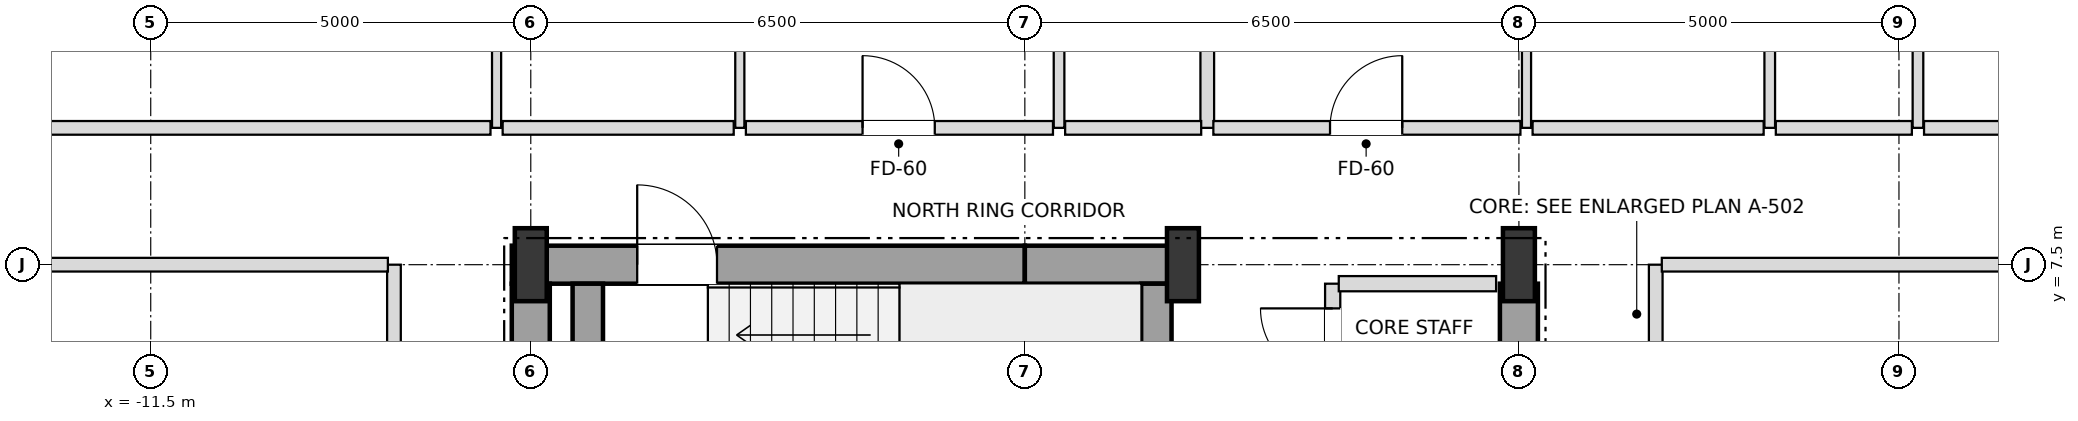
"""IFC4 building model, lengths in metres.
Left out: names, types, materials, properties, quantities, classifications, styles, units other than length and angle.
Written with IfcOpenShell. Run it as: python <this file> out.ifc"""

import sys

from ifc_helpers import new_model, si_unit, direction, frame, frame_2d, origin, origin_2d, place, context, subcontext, project, spatial, rectangle, i_section, extrude, element, fill, save


model = new_model("IFC4")
c1 = context("Model", 3, precision=1e-05, world=origin(), true_north=direction((0.0, 1.0)))
c2 = subcontext(c1, "Body", "Model", "MODEL_VIEW")
j1 = project(units=[si_unit("LENGTHUNIT", "METRE"), si_unit("PLANEANGLEUNIT", "RADIAN")], contexts=[c1])
p1 = place(None, origin())
s1 = spatial("IfcSite", under=j1, at=p1, CompositionType="ELEMENT")
p2 = place(p1, origin())
s2 = spatial("IfcBuilding", under=s1, at=p2, CompositionType="ELEMENT")
p3 = place(p2, frame((0.0, 0.0, 61.2)))
s3 = spatial("IfcBuildingStorey", under=s2, at=p3, CompositionType="ELEMENT", Elevation=61.2)
for number, where, z_axis, x_axis in (
    (1, (-6.5, 7.5, 0.0), (0.0, 0.0, 1.0), (1.0, 0.0, 0.0)),
    (2, (2.08, 7.5, 0.0), (0.0, 0.0, 1.0), (1.0, 0.0, 0.0)),
    (3, (6.5, 7.5, 0.0), (0.0, 0.0, 1.0), (1.0, 0.0, 0.0)),
):
    element("IfcColumn", number, at=place(p3, frame(where, z_axis=z_axis, x_axis=x_axis)), inside=s3, PredefinedType="COLUMN", context=c2, shape_type="SweptSolid", body=[
        extrude(i_section(OverallWidth=0.42, OverallDepth=0.96, WebThickness=0.022, FlangeThickness=0.034, at=origin_2d()), origin(), (0.0, 0.0, 1.0), 3.6),
    ])
p4 = place(p3, frame((-6.75, 7.5, 0.0), z_axis=(0.0, 0.0, 1.0), x_axis=(1.0, 0.0, 0.0)))
e4 = element("IfcWall", 4, at=p4, inside=s3, PredefinedType="SHEAR", context=c2, shape_type="SweptSolid", body=[
    extrude(rectangle(XDim=6.75, YDim=0.5, at=frame_2d((3.375, 0.0))), origin(), (0.0, 0.0, 1.0), 3.38),
])
p5 = place(p4, frame((1.65, 0.0, 0.0)))
e5 = element("IfcOpeningElement", 5, at=p5, cuts=e4, PredefinedType="OPENING", context=c2, shape_type="SweptSolid", body=[
    extrude(rectangle(XDim=1.05, YDim=2.15, at=frame_2d((0.525, 1.075))), frame((0.0, 0.26, 0.0), z_axis=(0.0, -1.0, 0.0), x_axis=(1.0, 0.0, 0.0)), (0.0, 0.0, 1.0), 0.52),
])
p6 = place(p3, frame((0.0, 7.5, 0.0), z_axis=(0.0, 0.0, 1.0), x_axis=(1.0, 0.0, 0.0)))
e6 = element("IfcWall", 6, at=p6, inside=s3, PredefinedType="SHEAR", context=c2, shape_type="SweptSolid", body=[
    extrude(rectangle(XDim=2.08, YDim=0.5, at=frame_2d((1.04, 0.0))), origin(), (0.0, 0.0, 1.0), 3.38),
])
for number, where, z_axis, x_axis in (
    (7, (-6.5, 3.95, 0.0), (0.0, 0.0, 1.0), (0.0, 1.0, 0.0)),
    (8, (6.5, 3.95, 0.0), (0.0, 0.0, 1.0), (0.0, 1.0, 0.0)),
):
    element("IfcWall", number, at=place(p3, frame(where, z_axis=z_axis, x_axis=x_axis)), inside=s3, PredefinedType="SHEAR", context=c2, shape_type="SweptSolid", body=[
        extrude(rectangle(XDim=3.3, YDim=0.5, at=frame_2d((1.65, 0.0))), origin(), (0.0, 0.0, 1.0), 3.38),
    ])
for number, where, z_axis, x_axis in (
    (9, (1.73, 3.95, 0.0), (0.0, 0.0, 1.0), (0.0, 1.0, 0.0)),
    (10, (-5.75, 3.95, 0.0), (0.0, 0.0, 1.0), (0.0, 1.0, 0.0)),
):
    element("IfcWall", number, at=place(p3, frame(where, z_axis=z_axis, x_axis=x_axis)), inside=s3, PredefinedType="SHEAR", context=c2, shape_type="SweptSolid", body=[
        extrude(rectangle(XDim=3.3, YDim=0.4, at=frame_2d((1.65, 0.0))), origin(), (0.0, 0.0, 1.0), 3.38),
    ])
p7 = place(p3, frame((-8.3, -7.5, 0.0), z_axis=(0.0, 0.0, 1.0), x_axis=(0.0, 1.0, 0.0)))
e11 = element("IfcWall", 11, at=p7, inside=s3, PredefinedType="PARTITIONING", context=c2, shape_type="SweptSolid", body=[
    extrude(rectangle(XDim=15.0, YDim=0.18, at=frame_2d((7.5, 0.0))), origin(), (0.0, 0.0, 1.0), 3.38),
])
p8 = place(p7, frame((3.475, 0.0, 0.0)))
e12 = element("IfcOpeningElement", 12, at=p8, cuts=e11, PredefinedType="OPENING", context=c2, shape_type="SweptSolid", body=[
    extrude(rectangle(XDim=0.95, YDim=2.15, at=frame_2d((0.475, 1.075))), frame((0.0, 0.1, 0.0), z_axis=(0.0, -1.0, 0.0), x_axis=(1.0, 0.0, 0.0)), (0.0, 0.0, 1.0), 0.2),
])
p9 = place(p3, frame((-6.95, 9.3, 0.0), z_axis=(0.0, 0.0, 1.0), x_axis=(0.0, 1.0, 0.0)))
e13 = element("IfcWall", 13, at=p9, inside=s3, PredefinedType="PARTITIONING", context=c2, shape_type="SweptSolid", body=[
    extrude(rectangle(XDim=9.6, YDim=0.12, at=frame_2d((4.8, 0.0))), origin(), (0.0, 0.0, 1.0), 2.816),
])
p10 = place(p9, frame((4.35, 0.0, 0.0)))
e14 = element("IfcOpeningElement", 14, at=p10, cuts=e13, PredefinedType="OPENING", context=c2, shape_type="SweptSolid", body=[
    extrude(rectangle(XDim=0.9, YDim=2.1, at=frame_2d((0.45, 1.05))), frame((0.0, 0.07, 0.0), z_axis=(0.0, -1.0, 0.0), x_axis=(1.0, 0.0, 0.0)), (0.0, 0.0, 1.0), 0.14),
])
p11 = place(p3, frame((-3.75, 9.3, 0.0), z_axis=(0.0, 0.0, 1.0), x_axis=(0.0, 1.0, 0.0)))
e15 = element("IfcWall", 15, at=p11, inside=s3, PredefinedType="PARTITIONING", context=c2, shape_type="SweptSolid", body=[
    extrude(rectangle(XDim=15.6, YDim=0.12, at=frame_2d((7.8, 0.0))), origin(), (0.0, 0.0, 1.0), 2.816),
])
p12 = place(p11, frame((4.325, 0.0, 0.0)))
e16 = element("IfcOpeningElement", 16, at=p12, cuts=e15, PredefinedType="OPENING", context=c2, shape_type="SweptSolid", body=[
    extrude(rectangle(XDim=0.95, YDim=2.1, at=frame_2d((0.475, 1.05))), frame((0.0, 0.07, 0.0), z_axis=(0.0, -1.0, 0.0), x_axis=(1.0, 0.0, 0.0)), (0.0, 0.0, 1.0), 0.14),
])
p13 = place(p11, frame((12.15, 0.0, 0.0)))
e17 = element("IfcOpeningElement", 17, at=p13, cuts=e15, PredefinedType="OPENING", context=c2, shape_type="SweptSolid", body=[
    extrude(rectangle(XDim=0.9, YDim=2.1, at=frame_2d((0.45, 1.05))), frame((0.0, 0.07, 0.0), z_axis=(0.0, -1.0, 0.0), x_axis=(1.0, 0.0, 0.0)), (0.0, 0.0, 1.0), 0.14),
])
p14 = place(p3, frame((0.45, 9.3, 0.0), z_axis=(0.0, 0.0, 1.0), x_axis=(0.0, 1.0, 0.0)))
e18 = element("IfcWall", 18, at=p14, inside=s3, PredefinedType="PARTITIONING", context=c2, shape_type="SweptSolid", body=[
    extrude(rectangle(XDim=9.6, YDim=0.14, at=frame_2d((4.8, 0.0))), origin(), (0.0, 0.0, 1.0), 2.948),
])
p15 = place(p14, frame((4.35, 0.0, 0.0)))
e19 = element("IfcOpeningElement", 19, at=p15, cuts=e18, PredefinedType="OPENING", context=c2, shape_type="SweptSolid", body=[
    extrude(rectangle(XDim=0.9, YDim=2.1, at=frame_2d((0.45, 1.05))), frame((0.0, 0.08, 0.0), z_axis=(0.0, -1.0, 0.0), x_axis=(1.0, 0.0, 0.0)), (0.0, 0.0, 1.0), 0.16),
])
p16 = place(p3, frame((2.4, 9.3, 0.0), z_axis=(0.0, 0.0, 1.0), x_axis=(0.0, 1.0, 0.0)))
e20 = element("IfcWall", 20, at=p16, inside=s3, PredefinedType="PARTITIONING", context=c2, shape_type="SweptSolid", body=[
    extrude(rectangle(XDim=15.6, YDim=0.18, at=frame_2d((7.8, 0.0))), origin(), (0.0, 0.0, 1.0), 2.816),
])
p17 = place(p3, frame((4.05, 4.2, 0.0), z_axis=(0.0, 0.0, 1.0), x_axis=(0.0, 1.0, 0.0)))
e21 = element("IfcWall", 21, at=p17, inside=s3, PredefinedType="SOLIDWALL", context=c2, shape_type="SweptSolid", body=[
    extrude(rectangle(XDim=3.05, YDim=0.2, at=frame_2d((1.525, 0.0))), origin(), (0.0, 0.0, 1.0), 3.38),
])
p18 = place(p17, frame((0.275, 0.0, 0.0)))
e22 = element("IfcOpeningElement", 22, at=p18, cuts=e21, PredefinedType="OPENING", context=c2, shape_type="SweptSolid", body=[
    extrude(rectangle(XDim=0.95, YDim=2.15, at=frame_2d((0.475, 1.075))), frame((0.0, 0.11, 0.0), z_axis=(0.0, -1.0, 0.0), x_axis=(1.0, 0.0, 0.0)), (0.0, 0.0, 1.0), 0.22),
])
p19 = place(p17, frame((1.775, 0.0, 0.0)))
e23 = element("IfcOpeningElement", 23, at=p19, cuts=e21, PredefinedType="OPENING", context=c2, shape_type="SweptSolid", body=[
    extrude(rectangle(XDim=0.95, YDim=2.15, at=frame_2d((0.475, 1.075))), frame((0.0, 0.11, 0.0), z_axis=(0.0, -1.0, 0.0), x_axis=(1.0, 0.0, 0.0)), (0.0, 0.0, 1.0), 0.22),
])
p20 = place(p3, frame((6.6, 9.3, 0.0), z_axis=(0.0, 0.0, 1.0), x_axis=(0.0, 1.0, 0.0)))
e24 = element("IfcWall", 24, at=p20, inside=s3, PredefinedType="PARTITIONING", context=c2, shape_type="SweptSolid", body=[
    extrude(rectangle(XDim=9.6, YDim=0.12, at=frame_2d((4.8, 0.0))), origin(), (0.0, 0.0, 1.0), 2.816),
])
p21 = place(p20, frame((4.325, 0.0, 0.0)))
e25 = element("IfcOpeningElement", 25, at=p21, cuts=e24, PredefinedType="OPENING", context=c2, shape_type="SweptSolid", body=[
    extrude(rectangle(XDim=0.95, YDim=2.1, at=frame_2d((0.475, 1.05))), frame((0.0, 0.07, 0.0), z_axis=(0.0, -1.0, 0.0), x_axis=(1.0, 0.0, 0.0)), (0.0, 0.0, 1.0), 0.14),
])
p22 = place(p3, frame((8.3, -7.5, 0.0), z_axis=(0.0, 0.0, 1.0), x_axis=(0.0, 1.0, 0.0)))
e26 = element("IfcWall", 26, at=p22, inside=s3, PredefinedType="PARTITIONING", context=c2, shape_type="SweptSolid", body=[
    extrude(rectangle(XDim=15.0, YDim=0.18, at=frame_2d((7.5, 0.0))), origin(), (0.0, 0.0, 1.0), 3.38),
])
p23 = place(p22, frame((3.475, 0.0, 0.0)))
e27 = element("IfcOpeningElement", 27, at=p23, cuts=e26, PredefinedType="OPENING", context=c2, shape_type="SweptSolid", body=[
    extrude(rectangle(XDim=0.95, YDim=2.15, at=frame_2d((0.475, 1.075))), frame((0.0, 0.1, 0.0), z_axis=(0.0, -1.0, 0.0), x_axis=(1.0, 0.0, 0.0)), (0.0, 0.0, 1.0), 0.2),
])
p24 = place(p3, frame((9.8, 9.3, 0.0), z_axis=(0.0, 0.0, 1.0), x_axis=(0.0, 1.0, 0.0)))
e28 = element("IfcWall", 28, at=p24, inside=s3, PredefinedType="PARTITIONING", context=c2, shape_type="SweptSolid", body=[
    extrude(rectangle(XDim=9.6, YDim=0.14, at=frame_2d((4.8, 0.0))), origin(), (0.0, 0.0, 1.0), 2.816),
])
p25 = place(p24, frame((4.35, 0.0, 0.0)))
e29 = element("IfcOpeningElement", 29, at=p25, cuts=e28, PredefinedType="OPENING", context=c2, shape_type="SweptSolid", body=[
    extrude(rectangle(XDim=0.9, YDim=2.1, at=frame_2d((0.45, 1.05))), frame((0.0, 0.08, 0.0), z_axis=(0.0, -1.0, 0.0), x_axis=(1.0, 0.0, 0.0)), (0.0, 0.0, 1.0), 0.16),
])
p26 = place(p3, frame((11.75, 9.3, 0.0), z_axis=(0.0, 0.0, 1.0), x_axis=(0.0, 1.0, 0.0)))
e30 = element("IfcWall", 30, at=p26, inside=s3, PredefinedType="PARTITIONING", context=c2, shape_type="SweptSolid", body=[
    extrude(rectangle(XDim=15.6, YDim=0.14, at=frame_2d((7.8, 0.0))), origin(), (0.0, 0.0, 1.0), 2.736),
])
p27 = place(p26, frame((12.15, 0.0, 0.0)))
e31 = element("IfcOpeningElement", 31, at=p27, cuts=e30, PredefinedType="OPENING", context=c2, shape_type="SweptSolid", body=[
    extrude(rectangle(XDim=0.9, YDim=2.1, at=frame_2d((0.45, 1.05))), frame((0.0, 0.08, 0.0), z_axis=(0.0, -1.0, 0.0), x_axis=(1.0, 0.0, 0.0)), (0.0, 0.0, 1.0), 0.16),
])
p28 = place(p3, frame((4.13, 7.25, 0.0), z_axis=(0.0, 0.0, 1.0), x_axis=(1.0, 0.0, 0.0)))
e32 = element("IfcWall", 32, at=p28, inside=s3, PredefinedType="SOLIDWALL", context=c2, shape_type="SweptSolid", body=[
    extrude(rectangle(XDim=2.07, YDim=0.2, at=frame_2d((1.035, 0.0))), origin(), (0.0, 0.0, 1.0), 3.38),
])
for number, where, z_axis, x_axis in (
    (33, (-16.02, 7.5, 0.0), (0.0, 0.0, 1.0), (1.0, 0.0, 0.0)),
    (34, (8.38, 7.5, 0.0), (0.0, 0.0, 1.0), (1.0, 0.0, 0.0)),
):
    element("IfcWall", number, at=place(p3, frame(where, z_axis=z_axis, x_axis=x_axis)), inside=s3, PredefinedType="PARTITIONING", context=c2, shape_type="SweptSolid", body=[
        extrude(rectangle(XDim=7.64, YDim=0.18, at=frame_2d((3.82, 0.0))), origin(), (0.0, 0.0, 1.0), 2.816),
    ])
p29 = place(p3, frame((-18.32, 9.3, 0.0), z_axis=(0.0, 0.0, 1.0), x_axis=(1.0, 0.0, 0.0)))
e35 = element("IfcWall", 35, at=p29, inside=s3, PredefinedType="PARTITIONING", context=c2, shape_type="SweptSolid", body=[
    extrude(rectangle(XDim=11.29, YDim=0.18, at=frame_2d((5.645, 0.0))), origin(), (0.0, 0.0, 1.0), 2.816),
])
p30 = place(p3, frame((-6.87, 9.3, 0.0), z_axis=(0.0, 0.0, 1.0), x_axis=(1.0, 0.0, 0.0)))
e36 = element("IfcWall", 36, at=p30, inside=s3, PredefinedType="PARTITIONING", context=c2, shape_type="SweptSolid", body=[
    extrude(rectangle(XDim=3.04, YDim=0.18, at=frame_2d((1.52, 0.0))), origin(), (0.0, 0.0, 1.0), 2.816),
])
p31 = place(p3, frame((-3.67, 9.3, 0.0), z_axis=(0.0, 0.0, 1.0), x_axis=(1.0, 0.0, 0.0)))
e37 = element("IfcWall", 37, at=p31, inside=s3, PredefinedType="PARTITIONING", context=c2, shape_type="SweptSolid", body=[
    extrude(rectangle(XDim=4.04, YDim=0.18, at=frame_2d((2.02, 0.0))), origin(), (0.0, 0.0, 1.0), 3.38),
])
p32 = place(p31, frame((1.535, 0.0, 0.0)))
e38 = element("IfcOpeningElement", 38, at=p32, cuts=e37, PredefinedType="OPENING", context=c2, shape_type="SweptSolid", body=[
    extrude(rectangle(XDim=0.95, YDim=2.15, at=frame_2d((0.475, 1.075))), frame((0.0, 0.1, 0.0), z_axis=(0.0, -1.0, 0.0), x_axis=(1.0, 0.0, 0.0)), (0.0, 0.0, 1.0), 0.2),
])
p33 = place(p3, frame((0.53, 9.3, 0.0), z_axis=(0.0, 0.0, 1.0), x_axis=(1.0, 0.0, 0.0)))
e39 = element("IfcWall", 39, at=p33, inside=s3, PredefinedType="PARTITIONING", context=c2, shape_type="SweptSolid", body=[
    extrude(rectangle(XDim=1.79, YDim=0.18, at=frame_2d((0.895, 0.0))), origin(), (0.0, 0.0, 1.0), 3.38),
])
p34 = place(p3, frame((2.48, 9.3, 0.0), z_axis=(0.0, 0.0, 1.0), x_axis=(1.0, 0.0, 0.0)))
e40 = element("IfcWall", 40, at=p34, inside=s3, PredefinedType="PARTITIONING", context=c2, shape_type="SweptSolid", body=[
    extrude(rectangle(XDim=4.04, YDim=0.18, at=frame_2d((2.02, 0.0))), origin(), (0.0, 0.0, 1.0), 3.38),
])
p35 = place(p34, frame((1.535, 0.0, 0.0)))
e41 = element("IfcOpeningElement", 41, at=p35, cuts=e40, PredefinedType="OPENING", context=c2, shape_type="SweptSolid", body=[
    extrude(rectangle(XDim=0.95, YDim=2.15, at=frame_2d((0.475, 1.075))), frame((0.0, 0.1, 0.0), z_axis=(0.0, -1.0, 0.0), x_axis=(1.0, 0.0, 0.0)), (0.0, 0.0, 1.0), 0.2),
])
p36 = place(p3, frame((6.68, 9.3, 0.0), z_axis=(0.0, 0.0, 1.0), x_axis=(1.0, 0.0, 0.0)))
e42 = element("IfcWall", 42, at=p36, inside=s3, PredefinedType="PARTITIONING", context=c2, shape_type="SweptSolid", body=[
    extrude(rectangle(XDim=3.04, YDim=0.18, at=frame_2d((1.52, 0.0))), origin(), (0.0, 0.0, 1.0), 3.38),
])
p37 = place(p3, frame((9.88, 9.3, 0.0), z_axis=(0.0, 0.0, 1.0), x_axis=(1.0, 0.0, 0.0)))
e43 = element("IfcWall", 43, at=p37, inside=s3, PredefinedType="PARTITIONING", context=c2, shape_type="SweptSolid", body=[
    extrude(rectangle(XDim=1.79, YDim=0.18, at=frame_2d((0.895, 0.0))), origin(), (0.0, 0.0, 1.0), 3.38),
])
p38 = place(p3, frame((11.83, 9.3, 0.0), z_axis=(0.0, 0.0, 1.0), x_axis=(1.0, 0.0, 0.0)))
e44 = element("IfcWall", 44, at=p38, inside=s3, PredefinedType="PARTITIONING", context=c2, shape_type="SweptSolid", body=[
    extrude(rectangle(XDim=6.49, YDim=0.18, at=frame_2d((3.245, 0.0))), origin(), (0.0, 0.0, 1.0), 2.816),
])
p39 = place(p5, origin())
e45 = element("IfcDoor", 45, at=p39, inside=s3, OperationType="SINGLE_SWING_LEFT", PredefinedType="DOOR", context=c2, shape_type="SweptSolid", body=[
    extrude(rectangle(XDim=1.05, YDim=2.15, at=frame_2d((0.525, 1.075))), frame((0.0, 0.025, 0.0), z_axis=(0.0, -1.0, 0.0), x_axis=(1.0, 0.0, 0.0)), (0.0, 0.0, 1.0), 0.05),
])
fill(e5, e45)
p40 = place(p19, origin())
e46 = element("IfcDoor", 46, at=p40, inside=s3, OperationType="SINGLE_SWING_RIGHT", PredefinedType="DOOR", context=c2, shape_type="SweptSolid", body=[
    extrude(rectangle(XDim=0.95, YDim=2.15, at=frame_2d((0.475, 1.075))), frame((0.0, 0.025, 0.0), z_axis=(0.0, -1.0, 0.0), x_axis=(1.0, 0.0, 0.0)), (0.0, 0.0, 1.0), 0.05),
])
fill(e23, e46)
p41 = place(p32, origin())
e47 = element("IfcDoor", 47, at=p41, inside=s3, OperationType="SINGLE_SWING_LEFT", PredefinedType="DOOR", context=c2, shape_type="SweptSolid", body=[
    extrude(rectangle(XDim=0.95, YDim=2.15, at=frame_2d((0.475, 1.075))), frame((0.0, 0.025, 0.0), z_axis=(0.0, -1.0, 0.0), x_axis=(1.0, 0.0, 0.0)), (0.0, 0.0, 1.0), 0.05),
])
fill(e38, e47)
p42 = place(p35, origin())
e48 = element("IfcDoor", 48, at=p42, inside=s3, OperationType="SINGLE_SWING_RIGHT", PredefinedType="DOOR", context=c2, shape_type="SweptSolid", body=[
    extrude(rectangle(XDim=0.95, YDim=2.15, at=frame_2d((0.475, 1.075))), frame((0.0, 0.025, 0.0), z_axis=(0.0, -1.0, 0.0), x_axis=(1.0, 0.0, 0.0)), (0.0, 0.0, 1.0), 0.05),
])
fill(e41, e48)
save(model, sys.argv[1])
